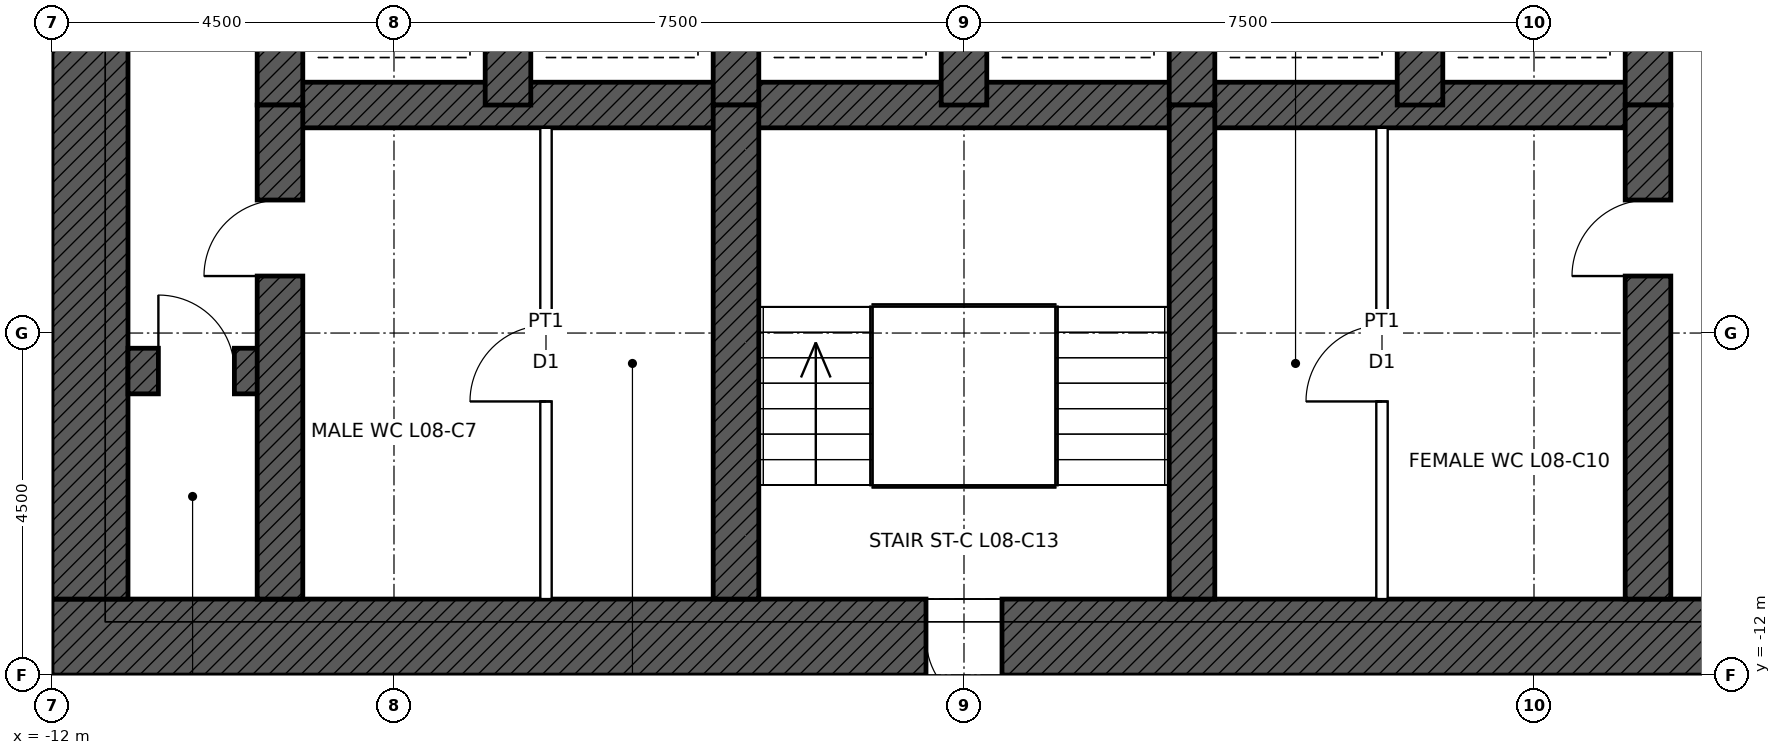
"""IFC4 building model, lengths in metres.
Left out: names, types, materials, properties, quantities, classifications, styles, units other than length and angle.
Written with IfcOpenShell. Run it as: python <this file> out.ifc"""

import sys

from ifc_helpers import new_model, si_unit, direction, frame, frame_2d, origin, place, context, subcontext, project, spatial, rectangle, extrude, element, fill, save


model = new_model("IFC4")
c1 = context("Model", 3, precision=1e-05, world=origin(), true_north=direction((0.0, 1.0)))
c2 = subcontext(c1, "Body", "Model", "MODEL_VIEW")
j1 = project(units=[si_unit("LENGTHUNIT", "METRE"), si_unit("PLANEANGLEUNIT", "RADIAN")], contexts=[c1])
p1 = place(None, origin())
s1 = spatial("IfcSite", under=j1, at=p1, CompositionType="ELEMENT")
p2 = place(p1, origin())
s2 = spatial("IfcBuilding", under=s1, at=p2, CompositionType="ELEMENT")
p3 = place(p2, frame((0.0, 0.0, 43.4)))
s3 = spatial("IfcBuildingStorey", under=s2, at=p3, CompositionType="ELEMENT", Elevation=43.4)
p4 = place(p3, frame((12.0, -11.5, 0.0), z_axis=(0.0, 0.0, 1.0), x_axis=(-1.0, 0.0, 0.0)))
e1 = element("IfcWall", 1, at=p4, inside=s3, PredefinedType="SHEAR", context=c2, shape_type="SweptSolid", body=[
    extrude(rectangle(XDim=24.0, YDim=1.0, at=frame_2d((12.0, 0.0))), origin(), (0.0, 0.0, 1.0), 5.0),
])
p5 = place(p4, frame((11.5, 0.0, 0.0)))
e2 = element("IfcOpeningElement", 2, at=p5, cuts=e1, PredefinedType="OPENING", context=c2, shape_type="SweptSolid", body=[
    extrude(rectangle(XDim=1.0, YDim=2.1, at=frame_2d((0.5, 1.05))), frame((0.0, 0.51, 0.0), z_axis=(0.0, -1.0, 0.0), x_axis=(1.0, 0.0, 0.0)), (0.0, 0.0, 1.0), 1.02),
])
p6 = place(p4, frame((1.0, 0.0, 0.0)))
e3 = element("IfcOpeningElement", 3, at=p6, cuts=e1, PredefinedType="OPENING", context=c2, shape_type="SweptSolid", body=[
    extrude(rectangle(XDim=1.0, YDim=2.4, at=frame_2d((0.5, 1.2))), frame((0.0, 0.51, 0.0), z_axis=(0.0, -1.0, 0.0), x_axis=(1.0, 0.0, 0.0)), (0.0, 0.0, 1.0), 1.02),
])
p7 = place(p3, frame((-11.5, -11.0, 0.0), z_axis=(0.0, 0.0, 1.0), x_axis=(0.0, 1.0, 0.0)))
e4 = element("IfcWall", 4, at=p7, inside=s3, PredefinedType="SHEAR", context=c2, shape_type="SweptSolid", body=[
    extrude(rectangle(XDim=22.0, YDim=1.0, at=frame_2d((11.0, 0.0))), origin(), (0.0, 0.0, 1.0), 5.0),
])
p8 = place(p7, frame((10.5, 0.0, 0.0)))
e5 = element("IfcOpeningElement", 5, at=p8, cuts=e4, PredefinedType="OPENING", context=c2, shape_type="SweptSolid", body=[
    extrude(rectangle(XDim=1.0, YDim=2.4, at=frame_2d((0.5, 1.2))), frame((0.0, 0.51, 0.0), z_axis=(0.0, -1.0, 0.0), x_axis=(1.0, 0.0, 0.0)), (0.0, 0.0, 1.0), 1.02),
])
p9 = place(p3, frame((-9.0, -4.5, 0.0), z_axis=(0.0, 0.0, 1.0), x_axis=(1.0, 0.0, 0.0)))
e6 = element("IfcWall", 6, at=p9, inside=s3, PredefinedType="SHEAR", context=c2, shape_type="SweptSolid", body=[
    extrude(rectangle(XDim=18.0, YDim=0.6, at=frame_2d((9.0, 0.0))), origin(), (0.0, 0.0, 1.0), 5.0),
])
p10 = place(p3, frame((-11.0, -8.0, 0.0), z_axis=(0.0, 0.0, 1.0), x_axis=(1.0, 0.0, 0.0)))
e7 = element("IfcWall", 7, at=p10, inside=s3, PredefinedType="SHEAR", context=c2, shape_type="SweptSolid", body=[
    extrude(rectangle(XDim=2.0, YDim=0.6, at=frame_2d((1.0, 0.0))), origin(), (0.0, 0.0, 1.0), 5.0),
])
p11 = place(p10, frame((0.4, 0.0, 0.0)))
e8 = element("IfcOpeningElement", 8, at=p11, cuts=e7, PredefinedType="OPENING", context=c2, shape_type="SweptSolid", body=[
    extrude(rectangle(XDim=1.0, YDim=2.1, at=frame_2d((0.5, 1.05))), frame((0.0, 0.31, 0.0), z_axis=(0.0, -1.0, 0.0), x_axis=(1.0, 0.0, 0.0)), (0.0, 0.0, 1.0), 0.62),
])
for number, where, z_axis, x_axis in (
    (9, (-9.0, -4.5, 0.0), (0.0, 0.0, 1.0), (0.0, 1.0, 0.0)),
    (10, (9.0, -4.5, 0.0), (0.0, 0.0, 1.0), (0.0, 1.0, 0.0)),
    (11, (-6.0, -4.5, 0.0), (0.0, 0.0, 1.0), (0.0, 1.0, 0.0)),
    (12, (-3.0, -4.5, 0.0), (0.0, 0.0, 1.0), (0.0, 1.0, 0.0)),
    (13, (0.0, -4.5, 0.0), (0.0, 0.0, 1.0), (0.0, 1.0, 0.0)),
    (14, (3.0, -4.5, 0.0), (0.0, 0.0, 1.0), (0.0, 1.0, 0.0)),
    (15, (6.0, -4.5, 0.0), (0.0, 0.0, 1.0), (0.0, 1.0, 0.0)),
):
    element("IfcWall", number, at=place(p3, frame(where, z_axis=z_axis, x_axis=x_axis)), inside=s3, PredefinedType="SHEAR", context=c2, shape_type="SweptSolid", body=[
        extrude(rectangle(XDim=3.0, YDim=0.6, at=frame_2d((1.5, 0.0))), origin(), (0.0, 0.0, 1.0), 5.0),
    ])
p12 = place(p3, frame((-9.0, -11.0, 0.0), z_axis=(0.0, 0.0, 1.0), x_axis=(0.0, 1.0, 0.0)))
e16 = element("IfcWall", 16, at=p12, inside=s3, PredefinedType="SHEAR", context=c2, shape_type="SweptSolid", body=[
    extrude(rectangle(XDim=6.5, YDim=0.6, at=frame_2d((3.25, 0.0))), origin(), (0.0, 0.0, 1.0), 5.0),
])
p13 = place(p12, frame((4.25, 0.0, 0.0)))
e17 = element("IfcOpeningElement", 17, at=p13, cuts=e16, PredefinedType="OPENING", context=c2, shape_type="SweptSolid", body=[
    extrude(rectangle(XDim=1.0, YDim=2.1, at=frame_2d((0.5, 1.05))), frame((0.0, 0.31, 0.0), z_axis=(0.0, -1.0, 0.0), x_axis=(1.0, 0.0, 0.0)), (0.0, 0.0, 1.0), 0.62),
])
p14 = place(p3, frame((9.0, -11.0, 0.0), z_axis=(0.0, 0.0, 1.0), x_axis=(0.0, 1.0, 0.0)))
e18 = element("IfcWall", 18, at=p14, inside=s3, PredefinedType="SHEAR", context=c2, shape_type="SweptSolid", body=[
    extrude(rectangle(XDim=6.5, YDim=0.6, at=frame_2d((3.25, 0.0))), origin(), (0.0, 0.0, 1.0), 5.0),
])
p15 = place(p14, frame((4.25, 0.0, 0.0)))
e19 = element("IfcOpeningElement", 19, at=p15, cuts=e18, PredefinedType="OPENING", context=c2, shape_type="SweptSolid", body=[
    extrude(rectangle(XDim=1.0, YDim=2.1, at=frame_2d((0.5, 1.05))), frame((0.0, 0.31, 0.0), z_axis=(0.0, -1.0, 0.0), x_axis=(1.0, 0.0, 0.0)), (0.0, 0.0, 1.0), 0.62),
])
for number, where, z_axis, x_axis in (
    (20, (-3.0, -11.0, 0.0), (0.0, 0.0, 1.0), (0.0, 1.0, 0.0)),
    (21, (3.0, -11.0, 0.0), (0.0, 0.0, 1.0), (0.0, 1.0, 0.0)),
):
    element("IfcWall", number, at=place(p3, frame(where, z_axis=z_axis, x_axis=x_axis)), inside=s3, PredefinedType="SHEAR", context=c2, shape_type="SweptSolid", body=[
        extrude(rectangle(XDim=6.5, YDim=0.6, at=frame_2d((3.25, 0.0))), origin(), (0.0, 0.0, 1.0), 5.0),
    ])
p16 = place(p3, frame((-5.5, -11.0, 0.0), z_axis=(0.0, 0.0, 1.0), x_axis=(0.0, 1.0, 0.0)))
e22 = element("IfcWall", 22, at=p16, inside=s3, PredefinedType="PARTITIONING", context=c2, shape_type="SweptSolid", body=[
    extrude(rectangle(XDim=6.2, YDim=0.15, at=frame_2d((3.1, 0.0))), origin(), (0.0, 0.0, 1.0), 4.75),
])
p17 = place(p16, frame((2.6, 0.0, 0.0)))
e23 = element("IfcOpeningElement", 23, at=p17, cuts=e22, PredefinedType="OPENING", context=c2, shape_type="SweptSolid", body=[
    extrude(rectangle(XDim=1.0, YDim=2.1, at=frame_2d((0.5, 1.05))), frame((0.0, 0.085, 0.0), z_axis=(0.0, -1.0, 0.0), x_axis=(1.0, 0.0, 0.0)), (0.0, 0.0, 1.0), 0.17),
])
p18 = place(p3, frame((5.5, -11.0, 0.0), z_axis=(0.0, 0.0, 1.0), x_axis=(0.0, 1.0, 0.0)))
e24 = element("IfcWall", 24, at=p18, inside=s3, PredefinedType="PARTITIONING", context=c2, shape_type="SweptSolid", body=[
    extrude(rectangle(XDim=6.2, YDim=0.15, at=frame_2d((3.1, 0.0))), origin(), (0.0, 0.0, 1.0), 4.75),
])
p19 = place(p18, frame((2.6, 0.0, 0.0)))
e25 = element("IfcOpeningElement", 25, at=p19, cuts=e24, PredefinedType="OPENING", context=c2, shape_type="SweptSolid", body=[
    extrude(rectangle(XDim=1.0, YDim=2.1, at=frame_2d((0.5, 1.05))), frame((0.0, 0.085, 0.0), z_axis=(0.0, -1.0, 0.0), x_axis=(1.0, 0.0, 0.0)), (0.0, 0.0, 1.0), 0.17),
])
p20 = place(p5, origin())
e26 = element("IfcDoor", 26, at=p20, inside=s3, OperationType="SINGLE_SWING_LEFT", PredefinedType="DOOR", context=c2, shape_type="SweptSolid", body=[
    extrude(rectangle(XDim=1.0, YDim=2.1, at=frame_2d((0.5, 1.05))), frame((0.0, 0.485, 0.0), z_axis=(0.0, -1.0, 0.0), x_axis=(1.0, 0.0, 0.0)), (0.0, 0.0, 1.0), 0.05),
])
fill(e2, e26)
p21 = place(p13, origin())
e27 = element("IfcDoor", 27, at=p21, inside=s3, OperationType="SINGLE_SWING_LEFT", PredefinedType="DOOR", context=c2, shape_type="SweptSolid", body=[
    extrude(rectangle(XDim=1.0, YDim=2.1, at=frame_2d((0.5, 1.05))), frame((0.0, 0.025, 0.0), z_axis=(0.0, -1.0, 0.0), x_axis=(1.0, 0.0, 0.0)), (0.0, 0.0, 1.0), 0.05),
])
fill(e17, e27)
p22 = place(p15, origin())
e28 = element("IfcDoor", 28, at=p22, inside=s3, OperationType="SINGLE_SWING_LEFT", PredefinedType="DOOR", context=c2, shape_type="SweptSolid", body=[
    extrude(rectangle(XDim=1.0, YDim=2.1, at=frame_2d((0.5, 1.05))), frame((0.0, 0.025, 0.0), z_axis=(0.0, -1.0, 0.0), x_axis=(1.0, 0.0, 0.0)), (0.0, 0.0, 1.0), 0.05),
])
fill(e19, e28)
p23 = place(p11, origin())
e29 = element("IfcDoor", 29, at=p23, inside=s3, OperationType="SINGLE_SWING_LEFT", PredefinedType="DOOR", context=c2, shape_type="SweptSolid", body=[
    extrude(rectangle(XDim=1.0, YDim=2.1, at=frame_2d((0.5, 1.05))), frame((0.0, 0.025, 0.0), z_axis=(0.0, -1.0, 0.0), x_axis=(1.0, 0.0, 0.0)), (0.0, 0.0, 1.0), 0.05),
])
fill(e8, e29)
p24 = place(p17, origin())
e30 = element("IfcDoor", 30, at=p24, inside=s3, OperationType="SINGLE_SWING_LEFT", PredefinedType="DOOR", context=c2, shape_type="SweptSolid", body=[
    extrude(rectangle(XDim=1.0, YDim=2.1, at=frame_2d((0.5, 1.05))), frame((0.0, 0.025, 0.0), z_axis=(0.0, -1.0, 0.0), x_axis=(1.0, 0.0, 0.0)), (0.0, 0.0, 1.0), 0.05),
])
fill(e23, e30)
p25 = place(p19, origin())
e31 = element("IfcDoor", 31, at=p25, inside=s3, OperationType="SINGLE_SWING_LEFT", PredefinedType="DOOR", context=c2, shape_type="SweptSolid", body=[
    extrude(rectangle(XDim=1.0, YDim=2.1, at=frame_2d((0.5, 1.05))), frame((0.0, 0.025, 0.0), z_axis=(0.0, -1.0, 0.0), x_axis=(1.0, 0.0, 0.0)), (0.0, 0.0, 1.0), 0.05),
])
fill(e25, e31)
save(model, sys.argv[1])
